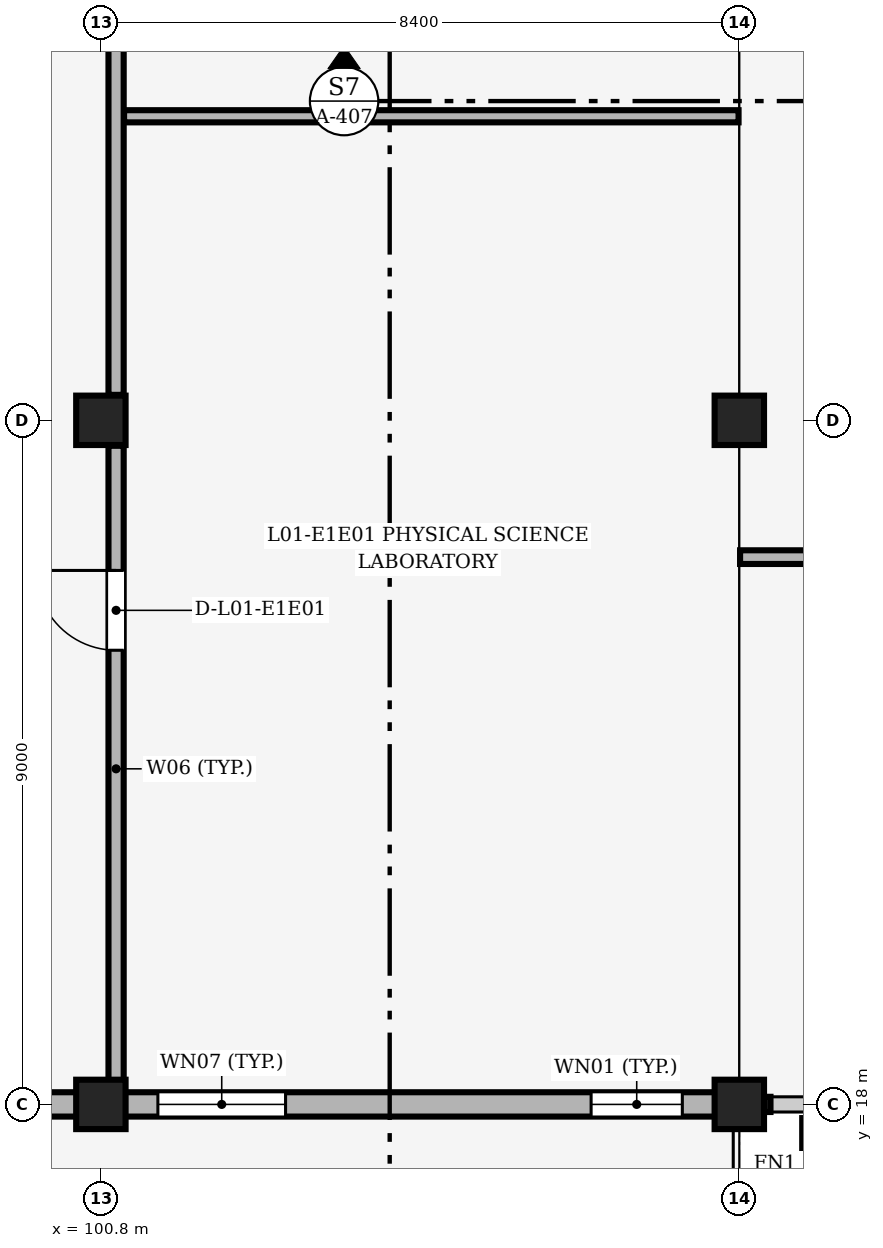
"""IFC4 building model, lengths in metres.
Left out: names, types, materials, properties, quantities, classifications, styles, units other than length and angle.
Written with IfcOpenShell. Run it as: python <this file> out.ifc"""

import sys

from ifc_helpers import new_model, si_unit, direction, frame, frame_2d, origin, origin_2d, place, context, subcontext, project, spatial, rectangle, extrude, element, fill, save


model = new_model("IFC4")
c1 = context("Model", 3, precision=1e-05, world=origin(), true_north=direction((0.0, 1.0)))
c2 = subcontext(c1, "Body", "Model", "MODEL_VIEW")
j1 = project(units=[si_unit("LENGTHUNIT", "METRE"), si_unit("PLANEANGLEUNIT", "RADIAN")], contexts=[c1])
p1 = place(None, origin())
s1 = spatial("IfcSite", under=j1, at=p1, CompositionType="ELEMENT")
p2 = place(p1, origin())
s2 = spatial("IfcBuilding", under=s1, at=p2, CompositionType="ELEMENT")
p3 = place(p2, frame((0.0, 0.0, 4.8)))
s3 = spatial("IfcBuildingStorey", under=s2, at=p3, CompositionType="ELEMENT", Elevation=4.8)
for number, where, z_axis, x_axis in (
    (1, (100.8, 18.0, 0.0), (0.0, 0.0, 1.0), (1.0, 0.0, 0.0)),
    (2, (100.8, 27.0, 0.0), (0.0, 0.0, 1.0), (1.0, 0.0, 0.0)),
    (3, (109.2, 18.0, 0.0), (0.0, 0.0, 1.0), (1.0, 0.0, 0.0)),
    (4, (109.2, 27.0, 0.0), (0.0, 0.0, 1.0), (1.0, 0.0, 0.0)),
):
    element("IfcColumn", number, at=place(p3, frame(where, z_axis=z_axis, x_axis=x_axis)), inside=s3, PredefinedType="COLUMN", context=c2, shape_type="SweptSolid", body=[
        extrude(rectangle(XDim=0.65, YDim=0.65, at=origin_2d()), origin(), (0.0, 0.0, 1.0), 4.2),
    ])
p4 = place(p3, frame((92.7, 18.0, 0.0), z_axis=(0.0, 0.0, 1.0), x_axis=(1.0, 0.0, 0.0)))
e5 = element("IfcWall", 5, at=p4, inside=s3, PredefinedType="SOLIDWALL", context=c2, shape_type="SweptSolid", body=[
    extrude(rectangle(XDim=7.8, YDim=0.32, at=frame_2d((3.9, 0.0))), origin(), (0.0, 0.0, 1.0), 3.15),
])
p5 = place(p4, frame((4.8, 0.0, 0.0), z_axis=(0.0, 0.0, 1.0), x_axis=(-1.0, 0.0, 0.0)))
e6 = element("IfcOpeningElement", 6, at=p5, cuts=e5, PredefinedType="OPENING", context=c2, shape_type="SweptSolid", body=[
    extrude(rectangle(XDim=1.8, YDim=2.3, at=frame_2d((0.9, 1.15))), frame((0.0, 0.17, 0.0), z_axis=(0.0, -1.0, 0.0), x_axis=(1.0, 0.0, 0.0)), (0.0, 0.0, 1.0), 0.34),
])
p6 = place(p4, frame((0.45, 0.0, 0.95)))
e7 = element("IfcOpeningElement", 7, at=p6, cuts=e5, PredefinedType="OPENING", context=c2, shape_type="SweptSolid", body=[
    extrude(rectangle(XDim=1.68, YDim=1.8, at=frame_2d((0.84, 0.9))), frame((0.0, 0.17, 0.0), z_axis=(0.0, -1.0, 0.0), x_axis=(1.0, 0.0, 0.0)), (0.0, 0.0, 1.0), 0.34),
])
p7 = place(p3, frame((101.1, 18.0, 0.0), z_axis=(0.0, 0.0, 1.0), x_axis=(1.0, 0.0, 0.0)))
e8 = element("IfcWall", 8, at=p7, inside=s3, PredefinedType="SOLIDWALL", context=c2, shape_type="SweptSolid", body=[
    extrude(rectangle(XDim=7.8, YDim=0.32, at=frame_2d((3.9, 0.0))), origin(), (0.0, 0.0, 1.0), 3.1),
])
p8 = place(p7, frame((0.45, 0.0, 0.9)))
e9 = element("IfcOpeningElement", 9, at=p8, cuts=e8, PredefinedType="OPENING", context=c2, shape_type="SweptSolid", body=[
    extrude(rectangle(XDim=1.68, YDim=2.05, at=frame_2d((0.84, 1.025))), frame((0.0, 0.17, 0.0), z_axis=(0.0, -1.0, 0.0), x_axis=(1.0, 0.0, 0.0)), (0.0, 0.0, 1.0), 0.34),
])
p9 = place(p7, frame((6.15, 0.0, 0.9)))
e10 = element("IfcOpeningElement", 10, at=p9, cuts=e8, PredefinedType="OPENING", context=c2, shape_type="SweptSolid", body=[
    extrude(rectangle(XDim=1.2, YDim=1.5, at=frame_2d((0.6, 0.75))), frame((0.0, 0.17, 0.0), z_axis=(0.0, -1.0, 0.0), x_axis=(1.0, 0.0, 0.0)), (0.0, 0.0, 1.0), 0.34),
])
p10 = place(p3, frame((101.105, 31.0, 0.0), z_axis=(0.0, 0.0, 1.0), x_axis=(1.0, 0.0, 0.0)))
e11 = element("IfcWall", 11, at=p10, inside=s3, PredefinedType="PARTITIONING", context=c2, shape_type="SweptSolid", body=[
    extrude(rectangle(XDim=8.085, YDim=0.16, at=frame_2d((4.042, 0.0))), origin(), (0.0, 0.0, 1.0), 3.9),
])
p11 = place(p3, frame((101.0, 18.165, 0.0), z_axis=(0.0, 0.0, 1.0), x_axis=(0.0, 1.0, 0.0)))
e12 = element("IfcWall", 12, at=p11, inside=s3, PredefinedType="PARTITIONING", context=c2, shape_type="SweptSolid", body=[
    extrude(rectangle(XDim=8.5, YDim=0.2, at=frame_2d((4.25, 0.0))), origin(), (0.0, 0.0, 1.0), 3.2),
])
p12 = place(p11, frame((5.81, 0.0, 0.0)))
e13 = element("IfcOpeningElement", 13, at=p12, cuts=e12, PredefinedType="OPENING", context=c2, shape_type="SweptSolid", body=[
    extrude(rectangle(XDim=1.05, YDim=2.2, at=frame_2d((0.525, 1.1))), frame((0.0, 0.11, 0.0), z_axis=(0.0, -1.0, 0.0), x_axis=(1.0, 0.0, 0.0)), (0.0, 0.0, 1.0), 0.22),
])
p13 = place(p3, frame((101.0, 27.335, 0.0), z_axis=(0.0, 0.0, 1.0), x_axis=(0.0, 1.0, 0.0)))
e14 = element("IfcWall", 14, at=p13, inside=s3, PredefinedType="PARTITIONING", context=c2, shape_type="SweptSolid", body=[
    extrude(rectangle(XDim=7.73, YDim=0.2, at=frame_2d((3.865, 0.0))), origin(), (0.0, 0.0, 1.0), 3.15),
])
p14 = place(p3, frame((109.21, 25.2, 0.0), z_axis=(0.0, 0.0, 1.0), x_axis=(1.0, 0.0, 0.0)))
e15 = element("IfcWall", 15, at=p14, inside=s3, PredefinedType="PARTITIONING", context=c2, shape_type="SweptSolid", body=[
    extrude(rectangle(XDim=33.58, YDim=0.18, at=frame_2d((16.79, 0.0))), origin(), (0.0, 0.0, 1.0), 3.9),
])
p15 = place(p14, frame((5.14, 0.0, 0.0)))
e16 = element("IfcOpeningElement", 16, at=p15, cuts=e15, PredefinedType="OPENING", context=c2, shape_type="SweptSolid", body=[
    extrude(rectangle(XDim=0.9, YDim=2.1, at=frame_2d((0.45, 1.05))), frame((0.0, 0.1, 0.0), z_axis=(0.0, -1.0, 0.0), x_axis=(1.0, 0.0, 0.0)), (0.0, 0.0, 1.0), 0.2),
])
p16 = place(p14, frame((16.34, 0.0, 0.0)))
e17 = element("IfcOpeningElement", 17, at=p16, cuts=e15, PredefinedType="OPENING", context=c2, shape_type="SweptSolid", body=[
    extrude(rectangle(XDim=0.9, YDim=2.1, at=frame_2d((0.45, 1.05))), frame((0.0, 0.1, 0.0), z_axis=(0.0, -1.0, 0.0), x_axis=(1.0, 0.0, 0.0)), (0.0, 0.0, 1.0), 0.2),
])
p17 = place(p14, frame((27.54, 0.0, 0.0)))
e18 = element("IfcOpeningElement", 18, at=p17, cuts=e15, PredefinedType="OPENING", context=c2, shape_type="SweptSolid", body=[
    extrude(rectangle(XDim=0.9, YDim=2.1, at=frame_2d((0.45, 1.05))), frame((0.0, 0.1, 0.0), z_axis=(0.0, -1.0, 0.0), x_axis=(1.0, 0.0, 0.0)), (0.0, 0.0, 1.0), 0.2),
])
p18 = place(p8, origin())
e19 = element("IfcWindow", 19, at=p18, inside=s3, PartitioningType="SINGLE_PANEL", PredefinedType="WINDOW", context=c2, shape_type="SweptSolid", body=[
    extrude(rectangle(XDim=1.68, YDim=2.05, at=frame_2d((0.84, 1.025))), frame((0.0, 0.03, 0.0), z_axis=(0.0, -1.0, 0.0), x_axis=(1.0, 0.0, 0.0)), (0.0, 0.0, 1.0), 0.06),
])
fill(e9, e19)
p19 = place(p9, origin())
e20 = element("IfcWindow", 20, at=p19, inside=s3, PartitioningType="SINGLE_PANEL", PredefinedType="WINDOW", context=c2, shape_type="SweptSolid", body=[
    extrude(rectangle(XDim=1.2, YDim=1.5, at=frame_2d((0.6, 0.75))), frame((0.0, 0.03, 0.0), z_axis=(0.0, -1.0, 0.0), x_axis=(1.0, 0.0, 0.0)), (0.0, 0.0, 1.0), 0.06),
])
fill(e10, e20)
p20 = place(p12, origin())
e21 = element("IfcDoor", 21, at=p20, inside=s3, OperationType="SINGLE_SWING_RIGHT", PredefinedType="DOOR", context=c2, shape_type="SweptSolid", body=[
    extrude(rectangle(XDim=1.05, YDim=2.2, at=frame_2d((0.525, 1.1))), frame((0.0, 0.025, 0.0), z_axis=(0.0, -1.0, 0.0), x_axis=(1.0, 0.0, 0.0)), (0.0, 0.0, 1.0), 0.05),
])
fill(e13, e21)
save(model, sys.argv[1])
